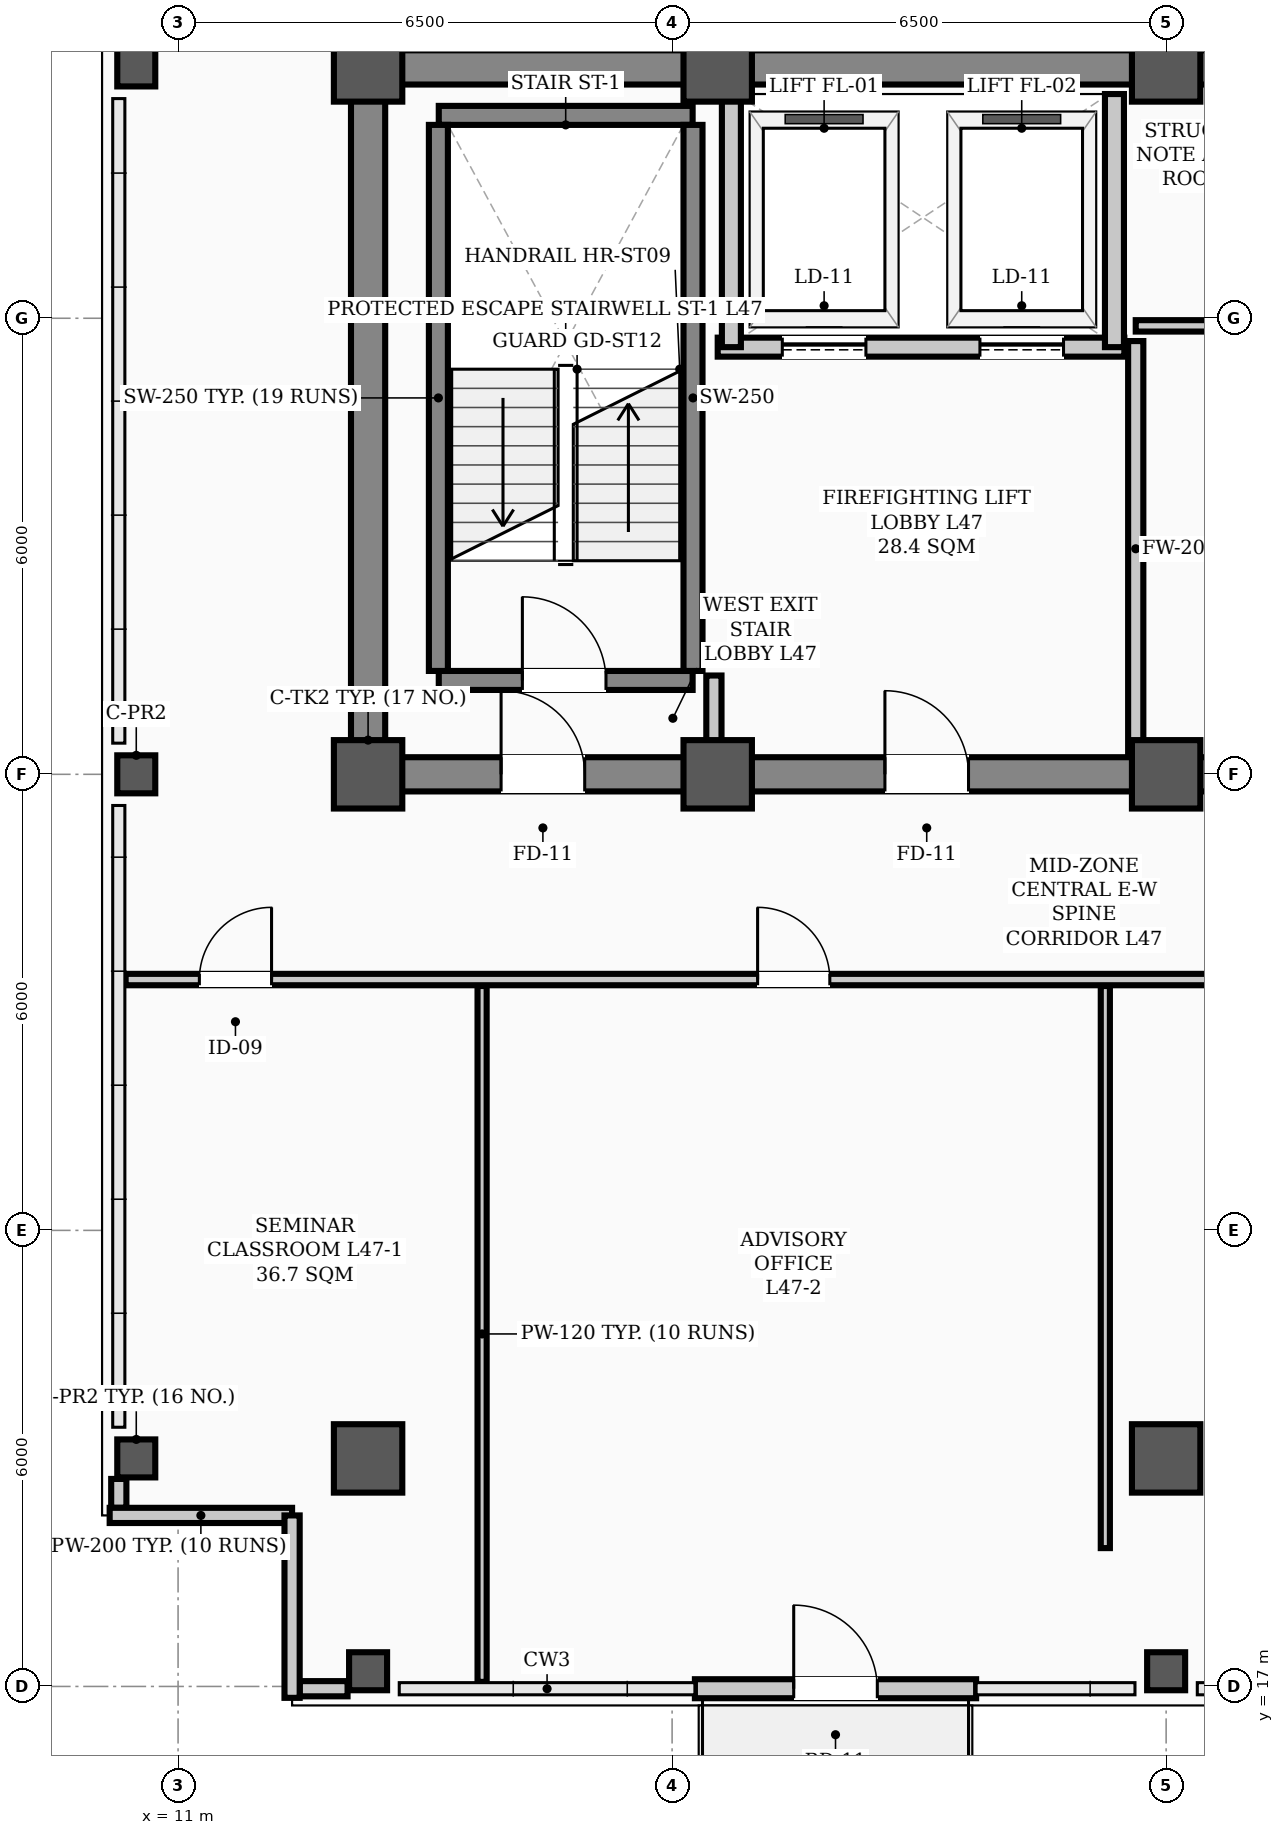
"""IFC4 building model, lengths in metres.
Left out: names, types, materials, properties, quantities, classifications, styles, units other than length and angle.
Written with IfcOpenShell. Run it as: python <this file> out.ifc"""

import sys

from ifc_helpers import new_model, si_unit, direction, frame, frame_2d, origin, origin_2d, place, context, subcontext, project, spatial, rectangle, hollow_rectangle, extrude, element, fill, save


model = new_model("IFC4")
c1 = context("Model", 3, precision=1e-05, world=origin(), true_north=direction((0.0, 1.0)))
c2 = subcontext(c1, "Body", "Model", "MODEL_VIEW")
j1 = project(units=[si_unit("LENGTHUNIT", "METRE"), si_unit("PLANEANGLEUNIT", "RADIAN")], contexts=[c1])
p1 = place(None, origin())
s1 = spatial("IfcSite", under=j1, at=p1, CompositionType="ELEMENT")
p2 = place(p1, origin())
s2 = spatial("IfcBuilding", under=s1, at=p2, CompositionType="ELEMENT")
p3 = place(p2, frame((0.0, 0.0, 189.0)))
s3 = spatial("IfcBuildingStorey", under=s2, at=p3, CompositionType="ELEMENT", Elevation=189.0)
for number, where, z_axis, x_axis in (
    (1, (13.5, 29.0, 0.0), (0.0, 0.0, 1.0), (1.0, 0.0, 0.0)),
    (2, (13.5, 38.3, 0.0), (0.0, 0.0, 1.0), (1.0, 0.0, 0.0)),
    (3, (18.1, 29.0, 0.0), (0.0, 0.0, 1.0), (1.0, 0.0, 0.0)),
    (4, (18.1, 38.3, 0.0), (0.0, 0.0, 1.0), (1.0, 0.0, 0.0)),
    (5, (24.0, 29.0, 0.0), (0.0, 0.0, 1.0), (1.0, 0.0, 0.0)),
    (6, (24.0, 38.3, 0.0), (0.0, 0.0, 1.0), (1.0, 0.0, 0.0)),
    (7, (13.5, 20.0, 0.0), (0.0, 0.0, 1.0), (1.0, 0.0, 0.0)),
    (8, (24.0, 20.0, 0.0), (0.0, 0.0, 1.0), (1.0, 0.0, 0.0)),
):
    element("IfcColumn", number, at=place(p3, frame(where, z_axis=z_axis, x_axis=x_axis)), inside=s3, PredefinedType="COLUMN", context=c2, shape_type="SweptSolid", body=[
        extrude(hollow_rectangle(XDim=0.9, YDim=0.9, WallThickness=0.035, InnerFilletRadius=0.017, OuterFilletRadius=0.052, at=origin_2d()), origin(), (0.0, 0.0, 1.0), 3.9),
    ])
for number, where, z_axis, x_axis in (
    (9, (10.45, 20.0, 0.0), (0.0, 0.0, 1.0), (1.0, 0.0, 0.0)),
    (10, (10.45, 29.0, 0.0), (0.0, 0.0, 1.0), (1.0, 0.0, 0.0)),
    (11, (10.45, 38.3, 0.0), (0.0, 0.0, 1.0), (1.0, 0.0, 0.0)),
    (12, (13.5, 17.2, 0.0), (0.0, 0.0, 1.0), (1.0, 0.0, 0.0)),
    (13, (24.0, 17.2, 0.0), (0.0, 0.0, 1.0), (1.0, 0.0, 0.0)),
):
    element("IfcColumn", number, at=place(p3, frame(where, z_axis=z_axis, x_axis=x_axis)), inside=s3, PredefinedType="COLUMN", context=c2, shape_type="SweptSolid", body=[
        extrude(hollow_rectangle(XDim=0.5, YDim=0.5, WallThickness=0.024, InnerFilletRadius=0.012, OuterFilletRadius=0.036, at=origin_2d()), origin(), (0.0, 0.0, 1.0), 3.9),
    ])
p4 = place(p3, frame((10.22, 19.35, 0.0), z_axis=(0.0, 0.0, 1.0), x_axis=(0.0, 1.0, 0.0)))
e14 = element("IfcWall", 14, at=p4, inside=s3, PredefinedType="PARAPET", context=c2, shape_type="SweptSolid", body=[
    extrude(rectangle(XDim=0.38, YDim=0.2, at=frame_2d((0.19, 0.0))), origin(), (0.0, 0.0, 1.0), 1.2),
])
p5 = place(p3, frame((12.6, 16.97, 0.0), z_axis=(0.0, 0.0, 1.0), x_axis=(1.0, 0.0, 0.0)))
e15 = element("IfcWall", 15, at=p5, inside=s3, PredefinedType="PARAPET", context=c2, shape_type="SweptSolid", body=[
    extrude(rectangle(XDim=0.63, YDim=0.2, at=frame_2d((0.315, 0.0))), origin(), (0.0, 0.0, 1.0), 1.2),
])
for number, where, z_axis, x_axis in (
    (16, (10.1, 19.25, 0.0), (0.0, 0.0, 1.0), (1.0, 0.0, 0.0)),
    (17, (12.5, 19.25, 0.0), (0.0, 0.0, 1.0), (0.0, -1.0, 0.0)),
):
    element("IfcWall", number, at=place(p3, frame(where, z_axis=z_axis, x_axis=x_axis)), inside=s3, PredefinedType="PARAPET", context=c2, shape_type="SweptSolid", body=[
        extrude(rectangle(XDim=2.4, YDim=0.2, at=frame_2d((1.2, 0.0))), origin(), (0.0, 0.0, 1.0), 1.2),
    ])
p6 = place(p3, frame((17.8, 16.97, 0.0), z_axis=(0.0, 0.0, 1.0), x_axis=(1.0, 0.0, 0.0)))
e18 = element("IfcWall", 18, at=p6, inside=s3, PredefinedType="STANDARD", context=c2, shape_type="SweptSolid", body=[
    extrude(rectangle(XDim=3.7, YDim=0.25, at=frame_2d((1.85, 0.0))), origin(), (0.0, 0.0, 1.0), 3.18),
])
p7 = place(p6, frame((1.3, 0.0, 0.0)))
e19 = element("IfcOpeningElement", 19, at=p7, cuts=e18, PredefinedType="OPENING", context=c2, shape_type="SweptSolid", body=[
    extrude(rectangle(XDim=1.1, YDim=2.2, at=frame_2d((0.55, 1.1))), frame((0.0, 0.135, 0.0), z_axis=(0.0, -1.0, 0.0), x_axis=(1.0, 0.0, 0.0)), (0.0, 0.0, 1.0), 0.27),
])
p8 = place(p3, frame((13.5, 29.0, 0.0), z_axis=(0.0, 0.0, 1.0), x_axis=(1.0, 0.0, 0.0)))
e20 = element("IfcWall", 20, at=p8, inside=s3, PredefinedType="SHEAR", context=c2, shape_type="SweptSolid", body=[
    extrude(rectangle(XDim=30.5, YDim=0.45, at=frame_2d((15.25, 0.0))), origin(), (0.0, 0.0, 1.0), 3.72),
])
p9 = place(p8, frame((1.75, 0.0, 0.0)))
e21 = element("IfcOpeningElement", 21, at=p9, cuts=e20, PredefinedType="OPENING", context=c2, shape_type="SweptSolid", body=[
    extrude(rectangle(XDim=1.1, YDim=2.08, at=frame_2d((0.55, 1.04))), frame((0.0, 0.235, 0.0), z_axis=(0.0, -1.0, 0.0), x_axis=(1.0, 0.0, 0.0)), (0.0, 0.0, 1.0), 0.47),
])
p10 = place(p8, frame((26.7, 0.0, 0.0)))
e22 = element("IfcOpeningElement", 22, at=p10, cuts=e20, PredefinedType="OPENING", context=c2, shape_type="SweptSolid", body=[
    extrude(rectangle(XDim=1.1, YDim=2.08, at=frame_2d((0.55, 1.04))), frame((0.0, 0.235, 0.0), z_axis=(0.0, -1.0, 0.0), x_axis=(1.0, 0.0, 0.0)), (0.0, 0.0, 1.0), 0.47),
])
p11 = place(p8, frame((6.8, 0.0, 0.0)))
e23 = element("IfcOpeningElement", 23, at=p11, cuts=e20, PredefinedType="OPENING", context=c2, shape_type="SweptSolid", body=[
    extrude(rectangle(XDim=1.1, YDim=2.08, at=frame_2d((0.55, 1.04))), frame((0.0, 0.235, 0.0), z_axis=(0.0, -1.0, 0.0), x_axis=(1.0, 0.0, 0.0)), (0.0, 0.0, 1.0), 0.47),
])
p12 = place(p8, frame((13.2, 0.0, 0.0)))
e24 = element("IfcOpeningElement", 24, at=p12, cuts=e20, PredefinedType="OPENING", context=c2, shape_type="SweptSolid", body=[
    extrude(rectangle(XDim=1.6, YDim=2.08, at=frame_2d((0.8, 1.04))), frame((0.0, 0.235, 0.0), z_axis=(0.0, -1.0, 0.0), x_axis=(1.0, 0.0, 0.0)), (0.0, 0.0, 1.0), 0.47),
])
p13 = place(p8, frame((19.6, 0.0, 0.0)))
e25 = element("IfcOpeningElement", 25, at=p13, cuts=e20, PredefinedType="OPENING", context=c2, shape_type="SweptSolid", body=[
    extrude(rectangle(XDim=0.9, YDim=2.08, at=frame_2d((0.45, 1.04))), frame((0.0, 0.235, 0.0), z_axis=(0.0, -1.0, 0.0), x_axis=(1.0, 0.0, 0.0)), (0.0, 0.0, 1.0), 0.47),
])
p14 = place(p8, frame((21.6, 0.0, 0.0)))
e26 = element("IfcOpeningElement", 26, at=p14, cuts=e20, PredefinedType="OPENING", context=c2, shape_type="SweptSolid", body=[
    extrude(rectangle(XDim=0.9, YDim=2.08, at=frame_2d((0.45, 1.04))), frame((0.0, 0.235, 0.0), z_axis=(0.0, -1.0, 0.0), x_axis=(1.0, 0.0, 0.0)), (0.0, 0.0, 1.0), 0.47),
])
p15 = place(p3, frame((13.5, 38.3, 0.0), z_axis=(0.0, 0.0, 1.0), x_axis=(1.0, 0.0, 0.0)))
e27 = element("IfcWall", 27, at=p15, inside=s3, PredefinedType="SHEAR", context=c2, shape_type="SweptSolid", body=[
    extrude(rectangle(XDim=30.5, YDim=0.45, at=frame_2d((15.25, 0.0))), origin(), (0.0, 0.0, 1.0), 3.72),
])
p16 = place(p3, frame((13.5, 29.35, 0.0), z_axis=(0.0, 0.0, 1.0), x_axis=(0.0, 1.0, 0.0)))
e28 = element("IfcWall", 28, at=p16, inside=s3, PredefinedType="SHEAR", context=c2, shape_type="SweptSolid", body=[
    extrude(rectangle(XDim=8.6, YDim=0.45, at=frame_2d((4.3, 0.0))), origin(), (0.0, 0.0, 1.0), 3.72),
])
p17 = place(p3, frame((14.43, 30.235, 0.0), z_axis=(0.0, 0.0, 1.0), x_axis=(1.0, 0.0, 0.0)))
e29 = element("IfcWall", 29, at=p17, inside=s3, PredefinedType="STANDARD", context=c2, shape_type="SweptSolid", body=[
    extrude(rectangle(XDim=3.34, YDim=0.25, at=frame_2d((1.67, 0.0))), origin(), (0.0, 0.0, 1.0), 3.72),
])
p18 = place(p17, frame((1.1, 0.0, 0.0)))
e30 = element("IfcOpeningElement", 30, at=p18, cuts=e29, PredefinedType="OPENING", context=c2, shape_type="SweptSolid", body=[
    extrude(rectangle(XDim=1.1, YDim=2.08, at=frame_2d((0.55, 1.04))), frame((0.0, 0.135, 0.0), z_axis=(0.0, -1.0, 0.0), x_axis=(1.0, 0.0, 0.0)), (0.0, 0.0, 1.0), 0.27),
])
p19 = place(p3, frame((14.43, 37.669, 0.0), z_axis=(0.0, 0.0, 1.0), x_axis=(1.0, 0.0, 0.0)))
e31 = element("IfcWall", 31, at=p19, inside=s3, PredefinedType="STANDARD", context=c2, shape_type="SweptSolid", body=[
    extrude(rectangle(XDim=3.34, YDim=0.25, at=frame_2d((1.67, 0.0))), origin(), (0.0, 0.0, 1.0), 3.72),
])
for number, where, z_axis, x_axis in (
    (32, (14.425, 30.36, 0.0), (0.0, 0.0, 1.0), (0.0, 1.0, 0.0)),
    (33, (17.775, 30.36, 0.0), (0.0, 0.0, 1.0), (0.0, 1.0, 0.0)),
):
    element("IfcWall", number, at=place(p3, frame(where, z_axis=z_axis, x_axis=x_axis)), inside=s3, PredefinedType="STANDARD", context=c2, shape_type="SweptSolid", body=[
        extrude(rectangle(XDim=7.184, YDim=0.25, at=frame_2d((3.592, 0.0))), origin(), (0.0, 0.0, 1.0), 3.72),
    ])
p20 = place(p3, frame((18.1, 34.62, 0.0), z_axis=(0.0, 0.0, 1.0), x_axis=(1.0, 0.0, 0.0)))
e34 = element("IfcWall", 34, at=p20, inside=s3, PredefinedType="STANDARD", context=c2, shape_type="SweptSolid", body=[
    extrude(rectangle(XDim=5.35, YDim=0.25, at=frame_2d((2.675, 0.0))), origin(), (0.0, 0.0, 1.0), 3.72),
])
p21 = place(p20, frame((0.85, 0.0, 0.0)))
e35 = element("IfcOpeningElement", 35, at=p21, cuts=e34, PredefinedType="OPENING", context=c2, shape_type="SweptSolid", body=[
    extrude(rectangle(XDim=1.1, YDim=2.08, at=frame_2d((0.55, 1.04))), frame((0.0, 0.135, 0.0), z_axis=(0.0, -1.0, 0.0), x_axis=(1.0, 0.0, 0.0)), (0.0, 0.0, 1.0), 0.27),
])
p22 = place(p20, frame((3.45, 0.0, 0.0)))
e36 = element("IfcOpeningElement", 36, at=p22, cuts=e34, PredefinedType="OPENING", context=c2, shape_type="SweptSolid", body=[
    extrude(rectangle(XDim=1.1, YDim=2.08, at=frame_2d((0.55, 1.04))), frame((0.0, 0.135, 0.0), z_axis=(0.0, -1.0, 0.0), x_axis=(1.0, 0.0, 0.0)), (0.0, 0.0, 1.0), 0.27),
])
for number, where, z_axis, x_axis in (
    (37, (18.28, 34.62, 0.0), (0.0, 0.0, 1.0), (0.0, 1.0, 0.0)),
    (38, (23.32, 34.62, 0.0), (0.0, 0.0, 1.0), (0.0, 1.0, 0.0)),
):
    element("IfcWall", number, at=place(p3, frame(where, z_axis=z_axis, x_axis=x_axis)), inside=s3, PredefinedType="STANDARD", context=c2, shape_type="SweptSolid", body=[
        extrude(rectangle(XDim=3.33, YDim=0.25, at=frame_2d((1.665, 0.0))), origin(), (0.0, 0.0, 1.0), 3.35),
    ])
p23 = place(p3, frame((23.6, 34.9, 0.0), z_axis=(0.0, 0.0, 1.0), x_axis=(1.0, 0.0, 0.0)))
e39 = element("IfcWall", 39, at=p23, inside=s3, PredefinedType="PARTITIONING", context=c2, shape_type="SweptSolid", body=[
    extrude(rectangle(XDim=4.58, YDim=0.15, at=frame_2d((2.29, 0.0))), origin(), (0.0, 0.0, 1.0), 3.72),
])
p24 = place(p23, frame((1.875, 0.0, 0.0)))
e40 = element("IfcOpeningElement", 40, at=p24, cuts=e39, PredefinedType="OPENING", context=c2, shape_type="SweptSolid", body=[
    extrude(rectangle(XDim=0.95, YDim=2.08, at=frame_2d((0.475, 1.04))), frame((0.0, 0.085, 0.0), z_axis=(0.0, -1.0, 0.0), x_axis=(1.0, 0.0, 0.0)), (0.0, 0.0, 1.0), 0.17),
])
p25 = place(p3, frame((10.31, 26.3, 0.0), z_axis=(0.0, 0.0, 1.0), x_axis=(1.0, 0.0, 0.0)))
e41 = element("IfcWall", 41, at=p25, inside=s3, PredefinedType="PARTITIONING", context=c2, shape_type="SweptSolid", body=[
    extrude(rectangle(XDim=43.38, YDim=0.15, at=frame_2d((21.69, 0.0))), origin(), (0.0, 0.0, 1.0), 3.2),
])
p26 = place(p25, frame((0.97, 0.0, 0.0)))
e42 = element("IfcOpeningElement", 42, at=p26, cuts=e41, PredefinedType="OPENING", context=c2, shape_type="SweptSolid", body=[
    extrude(rectangle(XDim=0.95, YDim=2.08, at=frame_2d((0.475, 1.04))), frame((0.0, 0.085, 0.0), z_axis=(0.0, -1.0, 0.0), x_axis=(1.0, 0.0, 0.0)), (0.0, 0.0, 1.0), 0.17),
])
p27 = place(p25, frame((8.315, 0.0, 0.0)))
e43 = element("IfcOpeningElement", 43, at=p27, cuts=e41, PredefinedType="OPENING", context=c2, shape_type="SweptSolid", body=[
    extrude(rectangle(XDim=0.95, YDim=2.08, at=frame_2d((0.475, 1.04))), frame((0.0, 0.085, 0.0), z_axis=(0.0, -1.0, 0.0), x_axis=(1.0, 0.0, 0.0)), (0.0, 0.0, 1.0), 0.17),
])
p28 = place(p25, frame((16.815, 0.0, 0.0)))
e44 = element("IfcOpeningElement", 44, at=p28, cuts=e41, PredefinedType="OPENING", context=c2, shape_type="SweptSolid", body=[
    extrude(rectangle(XDim=0.95, YDim=2.08, at=frame_2d((0.475, 1.04))), frame((0.0, 0.085, 0.0), z_axis=(0.0, -1.0, 0.0), x_axis=(1.0, 0.0, 0.0)), (0.0, 0.0, 1.0), 0.17),
])
p29 = place(p25, frame((24.515, 0.0, 0.0)))
e45 = element("IfcOpeningElement", 45, at=p29, cuts=e41, PredefinedType="OPENING", context=c2, shape_type="SweptSolid", body=[
    extrude(rectangle(XDim=0.95, YDim=2.08, at=frame_2d((0.475, 1.04))), frame((0.0, 0.085, 0.0), z_axis=(0.0, -1.0, 0.0), x_axis=(1.0, 0.0, 0.0)), (0.0, 0.0, 1.0), 0.17),
])
p30 = place(p25, frame((31.69, 0.0, 0.0)))
e46 = element("IfcOpeningElement", 46, at=p30, cuts=e41, PredefinedType="OPENING", context=c2, shape_type="SweptSolid", body=[
    extrude(rectangle(XDim=0.95, YDim=2.08, at=frame_2d((0.475, 1.04))), frame((0.0, 0.085, 0.0), z_axis=(0.0, -1.0, 0.0), x_axis=(1.0, 0.0, 0.0)), (0.0, 0.0, 1.0), 0.17),
])
p31 = place(p3, frame((18.05, 29.235, 0.0), z_axis=(0.0, 0.0, 1.0), x_axis=(0.0, 1.0, 0.0)))
e47 = element("IfcWall", 47, at=p31, inside=s3, PredefinedType="STANDARD", context=c2, shape_type="SweptSolid", body=[
    extrude(rectangle(XDim=1.065, YDim=0.2, at=frame_2d((0.532, 0.0))), origin(), (0.0, 0.0, 1.0), 3.35),
])
p32 = place(p3, frame((23.6, 29.235, 0.0), z_axis=(0.0, 0.0, 1.0), x_axis=(0.0, 1.0, 0.0)))
e48 = element("IfcWall", 48, at=p32, inside=s3, PredefinedType="STANDARD", context=c2, shape_type="SweptSolid", body=[
    extrude(rectangle(XDim=5.465, YDim=0.2, at=frame_2d((2.732, 0.0))), origin(), (0.0, 0.0, 1.0), 3.2),
])
p33 = place(p3, frame((15.0, 17.06, 0.0), z_axis=(0.0, 0.0, 1.0), x_axis=(0.0, 1.0, 0.0)))
e49 = element("IfcWall", 49, at=p33, inside=s3, PredefinedType="PARTITIONING", context=c2, shape_type="SweptSolid", body=[
    extrude(rectangle(XDim=9.155, YDim=0.12, at=frame_2d((4.578, 0.0))), origin(), (0.0, 0.0, 1.0), 3.1),
])
p34 = place(p3, frame((23.2, 18.82, 0.0), z_axis=(0.0, 0.0, 1.0), x_axis=(0.0, 1.0, 0.0)))
e50 = element("IfcWall", 50, at=p34, inside=s3, PredefinedType="PARTITIONING", context=c2, shape_type="SweptSolid", body=[
    extrude(rectangle(XDim=7.395, YDim=0.12, at=frame_2d((3.698, 0.0))), origin(), (0.0, 0.0, 1.0), 3.1),
])
p35 = place(p7, origin())
e51 = element("IfcDoor", 51, at=p35, inside=s3, OperationType="SINGLE_SWING_LEFT", PredefinedType="DOOR", context=c2, shape_type="SweptSolid", body=[
    extrude(rectangle(XDim=1.1, YDim=2.2, at=frame_2d((0.55, 1.1))), frame((0.0, 0.025, 0.0), z_axis=(0.0, -1.0, 0.0), x_axis=(1.0, 0.0, 0.0)), (0.0, 0.0, 1.0), 0.05),
])
fill(e19, e51)
p36 = place(p18, origin())
e52 = element("IfcDoor", 52, at=p36, inside=s3, OperationType="SINGLE_SWING_LEFT", PredefinedType="DOOR", context=c2, shape_type="SweptSolid", body=[
    extrude(rectangle(XDim=1.1, YDim=2.08, at=frame_2d((0.55, 1.04))), frame((0.0, 0.025, 0.0), z_axis=(0.0, -1.0, 0.0), x_axis=(1.0, 0.0, 0.0)), (0.0, 0.0, 1.0), 0.05),
])
fill(e30, e52)
p37 = place(p9, origin())
e53 = element("IfcDoor", 53, at=p37, inside=s3, OperationType="SINGLE_SWING_LEFT", PredefinedType="DOOR", context=c2, shape_type="SweptSolid", body=[
    extrude(rectangle(XDim=1.1, YDim=2.08, at=frame_2d((0.55, 1.04))), frame((0.0, 0.025, 0.0), z_axis=(0.0, -1.0, 0.0), x_axis=(1.0, 0.0, 0.0)), (0.0, 0.0, 1.0), 0.05),
])
fill(e21, e53)
p38 = place(p11, origin())
e54 = element("IfcDoor", 54, at=p38, inside=s3, OperationType="SINGLE_SWING_LEFT", PredefinedType="DOOR", context=c2, shape_type="SweptSolid", body=[
    extrude(rectangle(XDim=1.1, YDim=2.08, at=frame_2d((0.55, 1.04))), frame((0.0, 0.025, 0.0), z_axis=(0.0, -1.0, 0.0), x_axis=(1.0, 0.0, 0.0)), (0.0, 0.0, 1.0), 0.05),
])
fill(e23, e54)
p39 = place(p26, origin())
e55 = element("IfcDoor", 55, at=p39, inside=s3, OperationType="SINGLE_SWING_RIGHT", PredefinedType="DOOR", context=c2, shape_type="SweptSolid", body=[
    extrude(rectangle(XDim=0.95, YDim=2.08, at=frame_2d((0.475, 1.04))), frame((0.0, 0.025, 0.0), z_axis=(0.0, -1.0, 0.0), x_axis=(1.0, 0.0, 0.0)), (0.0, 0.0, 1.0), 0.05),
])
fill(e42, e55)
p40 = place(p27, origin())
e56 = element("IfcDoor", 56, at=p40, inside=s3, OperationType="SINGLE_SWING_LEFT", PredefinedType="DOOR", context=c2, shape_type="SweptSolid", body=[
    extrude(rectangle(XDim=0.95, YDim=2.08, at=frame_2d((0.475, 1.04))), frame((0.0, 0.025, 0.0), z_axis=(0.0, -1.0, 0.0), x_axis=(1.0, 0.0, 0.0)), (0.0, 0.0, 1.0), 0.05),
])
fill(e43, e56)
p41 = place(p21, origin())
e57 = element("IfcDoor", 57, at=p41, inside=s3, OperationType="SLIDING_TO_LEFT", PredefinedType="DOOR", context=c2, shape_type="SweptSolid", body=[
    extrude(rectangle(XDim=1.1, YDim=2.08, at=frame_2d((0.55, 1.04))), frame((0.0, 0.025, 0.0), z_axis=(0.0, -1.0, 0.0), x_axis=(1.0, 0.0, 0.0)), (0.0, 0.0, 1.0), 0.05),
])
fill(e35, e57)
p42 = place(p22, origin())
e58 = element("IfcDoor", 58, at=p42, inside=s3, OperationType="SLIDING_TO_LEFT", PredefinedType="DOOR", context=c2, shape_type="SweptSolid", body=[
    extrude(rectangle(XDim=1.1, YDim=2.08, at=frame_2d((0.55, 1.04))), frame((0.0, 0.025, 0.0), z_axis=(0.0, -1.0, 0.0), x_axis=(1.0, 0.0, 0.0)), (0.0, 0.0, 1.0), 0.05),
])
fill(e36, e58)
save(model, sys.argv[1])
